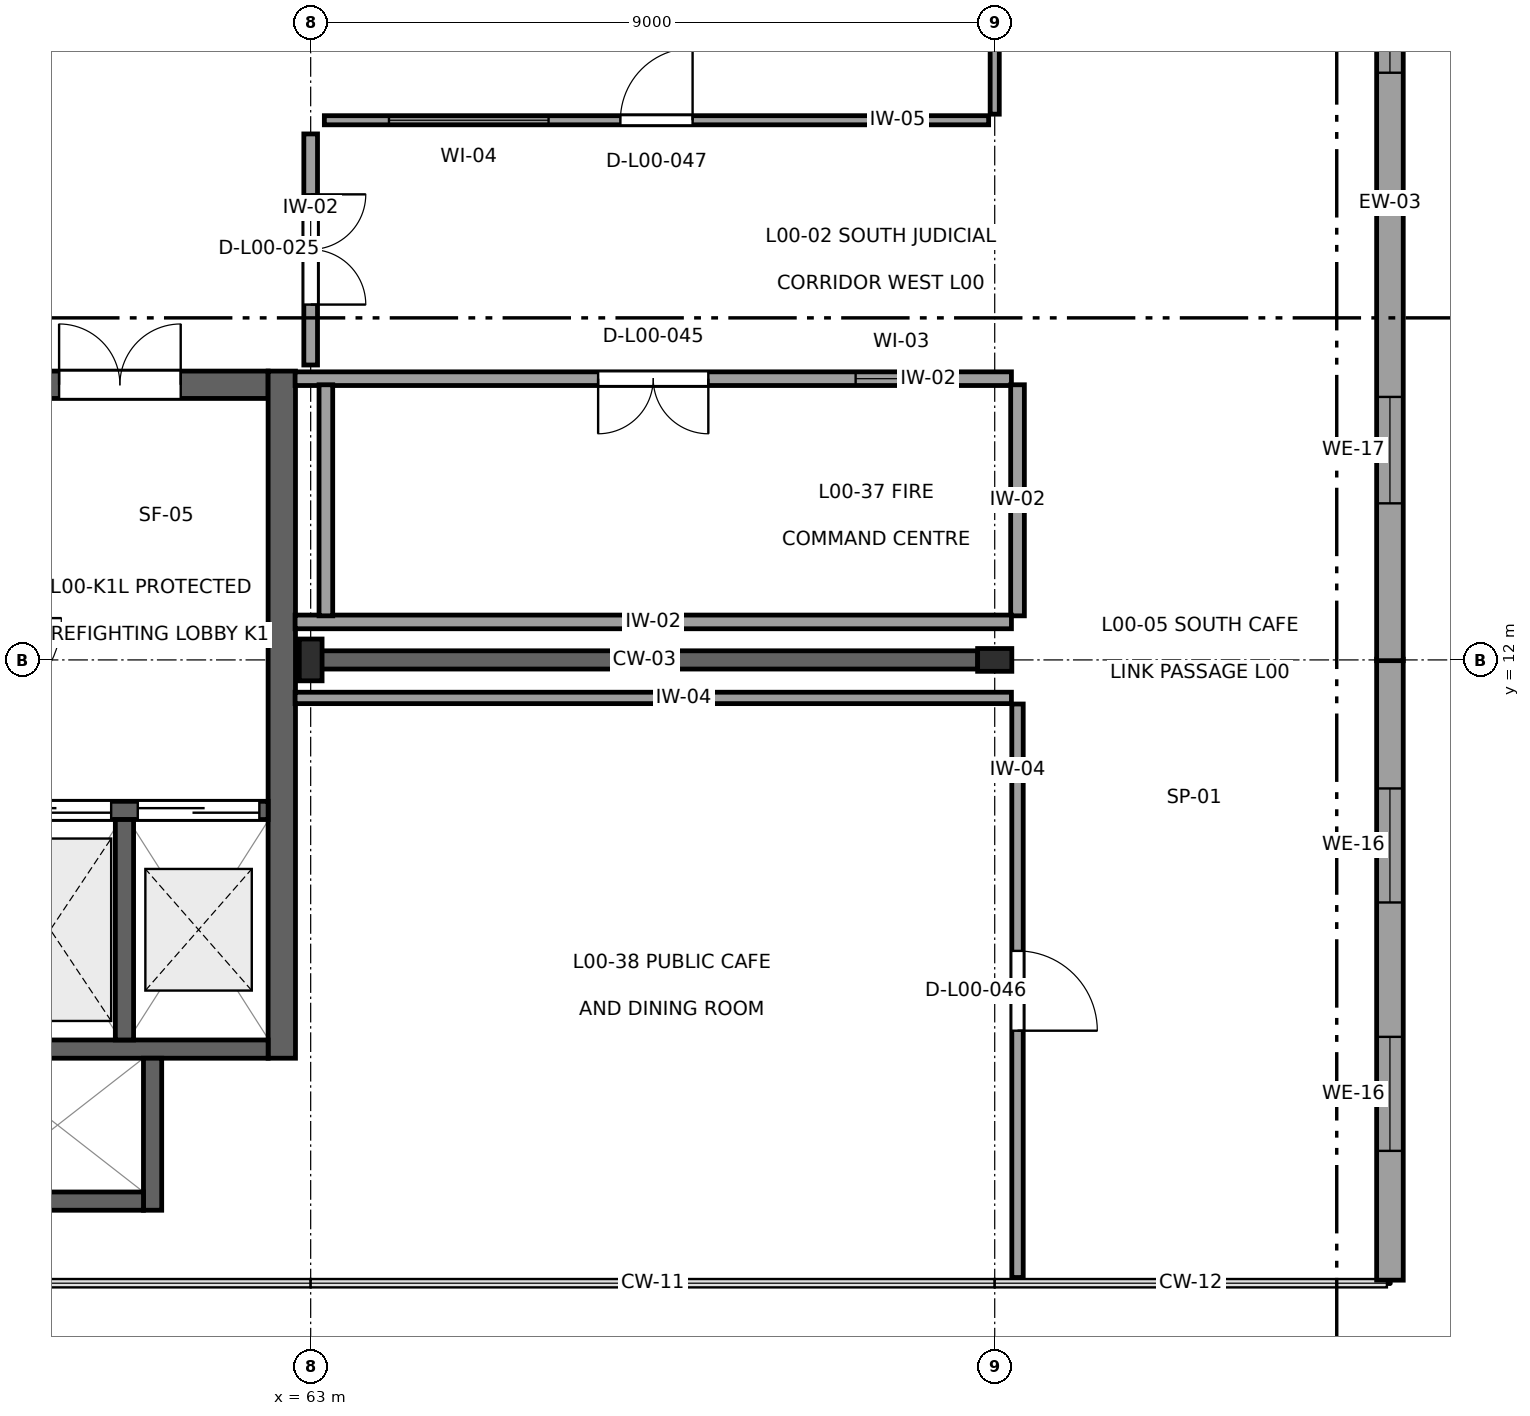
"""IFC4 building model, lengths in metres.
Left out: names, types, materials, properties, quantities, classifications, styles, units other than length and angle.
Written with IfcOpenShell. Run it as: python <this file> out.ifc"""

import sys

from ifc_helpers import new_model, si_unit, direction, frame, frame_2d, origin, origin_2d, place, context, subcontext, project, spatial, rectangle, i_section, extrude, element, fill, save


model = new_model("IFC4")
c1 = context("Model", 3, precision=1e-05, world=origin(), true_north=direction((0.0, 1.0)))
c2 = subcontext(c1, "Body", "Model", "MODEL_VIEW")
j1 = project(units=[si_unit("LENGTHUNIT", "METRE"), si_unit("PLANEANGLEUNIT", "RADIAN")], contexts=[c1])
p1 = place(None, origin())
s1 = spatial("IfcSite", under=j1, at=p1, CompositionType="ELEMENT")
p2 = place(p1, origin())
s2 = spatial("IfcBuilding", under=s1, at=p2, CompositionType="ELEMENT")
p3 = place(p2, origin())
s3 = spatial("IfcBuildingStorey", under=s2, at=p3, CompositionType="ELEMENT", Elevation=0.0)
p4 = place(p3, frame((63.0, 12.0, 0.0), z_axis=(0.0, 0.0, 1.0), x_axis=(1.0, 0.0, 0.0)))
e1 = element("IfcColumn", 1, at=p4, inside=s3, PredefinedType="COLUMN", context=c2, shape_type="SweptSolid", body=[
    extrude(i_section(OverallWidth=0.3, OverallDepth=0.55, WebThickness=0.015, FlangeThickness=0.029, at=origin_2d()), origin(), (0.0, 0.0, 1.0), 5.4),
])
p5 = place(p3, frame((72.0, 12.0, 0.0), z_axis=(0.0, 0.0, 1.0), x_axis=(0.0, 1.0, 0.0)))
e2 = element("IfcColumn", 2, at=p5, inside=s3, PredefinedType="COLUMN", context=c2, shape_type="SweptSolid", body=[
    extrude(i_section(OverallWidth=0.3, OverallDepth=0.45, WebThickness=0.014, FlangeThickness=0.026, at=origin_2d()), origin(), (0.0, 0.0, 1.0), 5.4),
])
p6 = place(p3, frame((77.2, 3.84, 0.0), z_axis=(0.0, 0.0, 1.0), x_axis=(0.0, 1.0, 0.0)))
e3 = element("IfcWall", 3, at=p6, inside=s3, PredefinedType="SOLIDWALL", context=c2, shape_type="SweptSolid", body=[
    extrude(rectangle(XDim=8.17, YDim=0.35, at=frame_2d((4.085, 0.0))), origin(), (0.0, 0.0, 1.0), 5.08),
])
p7 = place(p6, frame((1.701, 0.0, 0.85)))
e4 = element("IfcOpeningElement", 4, at=p7, cuts=e3, PredefinedType="OPENING", context=c2, shape_type="SweptSolid", body=[
    extrude(rectangle(XDim=1.5, YDim=1.5, at=frame_2d((0.75, 0.75))), frame((0.0, 0.19, 0.0), z_axis=(0.0, -1.0, 0.0), x_axis=(1.0, 0.0, 0.0)), (0.0, 0.0, 1.0), 0.38),
])
p8 = place(p6, frame((4.969, 0.0, 0.85)))
e5 = element("IfcOpeningElement", 5, at=p8, cuts=e3, PredefinedType="OPENING", context=c2, shape_type="SweptSolid", body=[
    extrude(rectangle(XDim=1.5, YDim=1.5, at=frame_2d((0.75, 0.75))), frame((0.0, 0.19, 0.0), z_axis=(0.0, -1.0, 0.0), x_axis=(1.0, 0.0, 0.0)), (0.0, 0.0, 1.0), 0.38),
])
p9 = place(p3, frame((77.2, 11.99, 0.0), z_axis=(0.0, 0.0, 1.0), x_axis=(0.0, 1.0, 0.0)))
e6 = element("IfcWall", 6, at=p9, inside=s3, PredefinedType="SOLIDWALL", context=c2, shape_type="SweptSolid", body=[
    extrude(rectangle(XDim=12.05, YDim=0.35, at=frame_2d((6.025, 0.0))), origin(), (0.0, 0.0, 1.0), 5.08),
])
p10 = place(p9, frame((2.07, 0.0, 0.85)))
e7 = element("IfcOpeningElement", 7, at=p10, cuts=e6, PredefinedType="OPENING", context=c2, shape_type="SweptSolid", body=[
    extrude(rectangle(XDim=1.4, YDim=1.4, at=frame_2d((0.7, 0.7))), frame((0.0, 0.19, 0.0), z_axis=(0.0, -1.0, 0.0), x_axis=(1.0, 0.0, 0.0)), (0.0, 0.0, 1.0), 0.38),
])
p11 = place(p9, frame((7.735, 0.0, 0.85)))
e8 = element("IfcOpeningElement", 8, at=p11, cuts=e6, PredefinedType="OPENING", context=c2, shape_type="SweptSolid", body=[
    extrude(rectangle(XDim=1.4, YDim=1.4, at=frame_2d((0.7, 0.7))), frame((0.0, 0.19, 0.0), z_axis=(0.0, -1.0, 0.0), x_axis=(1.0, 0.0, 0.0)), (0.0, 0.0, 1.0), 0.38),
])
p12 = place(p3, frame((58.54, 15.62, 0.0), z_axis=(0.0, 0.0, 1.0), x_axis=(1.0, 0.0, 0.0)))
e9 = element("IfcWall", 9, at=p12, inside=s3, PredefinedType="SHEAR", context=c2, shape_type="SweptSolid", body=[
    extrude(rectangle(XDim=3.9, YDim=0.36, at=frame_2d((1.95, 0.0))), origin(), (0.0, 0.0, 1.0), 5.06),
])
p13 = place(p12, frame((1.15, 0.0, 0.0)))
e10 = element("IfcOpeningElement", 10, at=p13, cuts=e9, PredefinedType="OPENING", context=c2, shape_type="SweptSolid", body=[
    extrude(rectangle(XDim=1.6, YDim=2.25, at=frame_2d((0.8, 1.125))), frame((0.0, 0.195, 0.0), z_axis=(0.0, -1.0, 0.0), x_axis=(1.0, 0.0, 0.0)), (0.0, 0.0, 1.0), 0.39),
])
p14 = place(p3, frame((62.62, 6.76, 0.0), z_axis=(0.0, 0.0, 1.0), x_axis=(0.0, 1.0, 0.0)))
e11 = element("IfcWall", 11, at=p14, inside=s3, PredefinedType="SHEAR", context=c2, shape_type="SweptSolid", body=[
    extrude(rectangle(XDim=9.04, YDim=0.36, at=frame_2d((4.52, 0.0))), origin(), (0.0, 0.0, 1.0), 5.06),
])
p15 = place(p3, frame((58.54, 10.02, 0.0), z_axis=(0.0, 0.0, 1.0), x_axis=(1.0, 0.0, 0.0)))
e12 = element("IfcWall", 12, at=p15, inside=s3, PredefinedType="SHEAR", context=c2, shape_type="SweptSolid", body=[
    extrude(rectangle(XDim=3.9, YDim=0.24, at=frame_2d((1.95, 0.0))), origin(), (0.0, 0.0, 1.0), 5.21),
])
p16 = place(p15, frame((0.235, 0.0, 0.0)))
e13 = element("IfcOpeningElement", 13, at=p16, cuts=e12, PredefinedType="OPENING", context=c2, shape_type="SweptSolid", body=[
    extrude(rectangle(XDim=1.6, YDim=2.3, at=frame_2d((0.8, 1.15))), frame((0.0, 0.135, 0.0), z_axis=(0.0, -1.0, 0.0), x_axis=(1.0, 0.0, 0.0)), (0.0, 0.0, 1.0), 0.27),
])
p17 = place(p15, frame((2.185, 0.0, 0.0)))
e14 = element("IfcOpeningElement", 14, at=p17, cuts=e12, PredefinedType="OPENING", context=c2, shape_type="SweptSolid", body=[
    extrude(rectangle(XDim=1.6, YDim=2.3, at=frame_2d((0.8, 1.15))), frame((0.0, 0.135, 0.0), z_axis=(0.0, -1.0, 0.0), x_axis=(1.0, 0.0, 0.0)), (0.0, 0.0, 1.0), 0.27),
])
p18 = place(p3, frame((58.54, 6.88, 0.0), z_axis=(0.0, 0.0, 1.0), x_axis=(1.0, 0.0, 0.0)))
e15 = element("IfcWall", 15, at=p18, inside=s3, PredefinedType="SHEAR", context=c2, shape_type="SweptSolid", body=[
    extrude(rectangle(XDim=3.9, YDim=0.24, at=frame_2d((1.95, 0.0))), origin(), (0.0, 0.0, 1.0), 5.21),
])
p19 = place(p3, frame((60.55, 7.0, 0.0), z_axis=(0.0, 0.0, 1.0), x_axis=(0.0, 1.0, 0.0)))
e16 = element("IfcWall", 16, at=p19, inside=s3, PredefinedType="SHEAR", context=c2, shape_type="SweptSolid", body=[
    extrude(rectangle(XDim=2.9, YDim=0.24, at=frame_2d((1.45, 0.0))), origin(), (0.0, 0.0, 1.0), 5.21),
])
p20 = place(p3, frame((60.92, 4.76, 0.0), z_axis=(0.0, 0.0, 1.0), x_axis=(0.0, 1.0, 0.0)))
e17 = element("IfcWall", 17, at=p20, inside=s3, PredefinedType="SHEAR", context=c2, shape_type="SweptSolid", body=[
    extrude(rectangle(XDim=2.0, YDim=0.24, at=frame_2d((1.0, 0.0))), origin(), (0.0, 0.0, 1.0), 5.21),
])
p21 = place(p3, frame((58.54, 4.88, 0.0), z_axis=(0.0, 0.0, 1.0), x_axis=(1.0, 0.0, 0.0)))
e18 = element("IfcWall", 18, at=p21, inside=s3, PredefinedType="SHEAR", context=c2, shape_type="SweptSolid", body=[
    extrude(rectangle(XDim=2.26, YDim=0.24, at=frame_2d((1.13, 0.0))), origin(), (0.0, 0.0, 1.0), 5.21),
])
p22 = place(p3, frame((63.008, 12.0, 0.0), z_axis=(0.0, 0.0, 1.0), x_axis=(1.0, 0.0, 0.0)))
e19 = element("IfcWall", 19, at=p22, inside=s3, PredefinedType="SHEAR", context=c2, shape_type="SweptSolid", body=[
    extrude(rectangle(XDim=8.769, YDim=0.24, at=frame_2d((4.385, 0.0))), origin(), (0.0, 0.0, 1.0), 4.535),
])
p23 = place(p3, frame((63.0, 18.92, 0.0), z_axis=(0.0, 0.0, 1.0), x_axis=(0.0, -1.0, 0.0)))
e20 = element("IfcWall", 20, at=p23, inside=s3, PredefinedType="PARTITIONING", context=c2, shape_type="SweptSolid", body=[
    extrude(rectangle(XDim=3.04, YDim=0.18, at=frame_2d((1.52, 0.0))), origin(), (0.0, 0.0, 1.0), 4.635),
])
p24 = place(p23, frame((0.795, 0.0, 0.0)))
e21 = element("IfcOpeningElement", 21, at=p24, cuts=e20, PredefinedType="OPENING", context=c2, shape_type="SweptSolid", body=[
    extrude(rectangle(XDim=1.45, YDim=2.2, at=frame_2d((0.725, 1.1))), frame((0.0, 0.105, 0.0), z_axis=(0.0, -1.0, 0.0), x_axis=(1.0, 0.0, 0.0)), (0.0, 0.0, 1.0), 0.21),
])
p25 = place(p3, frame((62.795, 15.7, 0.0), z_axis=(0.0, 0.0, 1.0), x_axis=(1.0, 0.0, 0.0)))
e22 = element("IfcWall", 22, at=p25, inside=s3, PredefinedType="PARTITIONING", context=c2, shape_type="SweptSolid", body=[
    extrude(rectangle(XDim=9.425, YDim=0.18, at=frame_2d((4.712, 0.0))), origin(), (0.0, 0.0, 1.0), 5.04),
])
p26 = place(p25, frame((3.987, 0.0, 0.0)))
e23 = element("IfcOpeningElement", 23, at=p26, cuts=e22, PredefinedType="OPENING", context=c2, shape_type="SweptSolid", body=[
    extrude(rectangle(XDim=1.45, YDim=2.3, at=frame_2d((0.725, 1.15))), frame((0.0, 0.105, 0.0), z_axis=(0.0, -1.0, 0.0), x_axis=(1.0, 0.0, 0.0)), (0.0, 0.0, 1.0), 0.21),
])
p27 = place(p25, frame((7.375, 0.0, 1.05)))
e24 = element("IfcOpeningElement", 24, at=p27, cuts=e22, PredefinedType="OPENING", context=c2, shape_type="SweptSolid", body=[
    extrude(rectangle(XDim=1.2, YDim=1.0, at=frame_2d((0.6, 0.5))), frame((0.0, 0.105, 0.0), z_axis=(0.0, -1.0, 0.0), x_axis=(1.0, 0.0, 0.0)), (0.0, 0.0, 1.0), 0.21),
])
p28 = place(p3, frame((72.3, 15.62, 0.0), z_axis=(0.0, 0.0, 1.0), x_axis=(0.0, -1.0, 0.0)))
e25 = element("IfcWall", 25, at=p28, inside=s3, PredefinedType="PARTITIONING", context=c2, shape_type="SweptSolid", body=[
    extrude(rectangle(XDim=3.04, YDim=0.18, at=frame_2d((1.52, 0.0))), origin(), (0.0, 0.0, 1.0), 5.04),
])
p29 = place(p3, frame((72.22, 12.5, 0.0), z_axis=(0.0, 0.0, 1.0), x_axis=(-1.0, 0.0, 0.0)))
e26 = element("IfcWall", 26, at=p29, inside=s3, PredefinedType="PARTITIONING", context=c2, shape_type="SweptSolid", body=[
    extrude(rectangle(XDim=9.425, YDim=0.18, at=frame_2d((4.712, 0.0))), origin(), (0.0, 0.0, 1.0), 5.04),
])
p30 = place(p3, frame((63.2, 12.58, 0.0), z_axis=(0.0, 0.0, 1.0), x_axis=(0.0, 1.0, 0.0)))
e27 = element("IfcWall", 27, at=p30, inside=s3, PredefinedType="PARTITIONING", context=c2, shape_type="SweptSolid", body=[
    extrude(rectangle(XDim=3.04, YDim=0.18, at=frame_2d((1.52, 0.0))), origin(), (0.0, 0.0, 1.0), 4.635),
])
p31 = place(p3, frame((72.3, 11.42, 0.0), z_axis=(0.0, 0.0, 1.0), x_axis=(0.0, -1.0, 0.0)))
e28 = element("IfcWall", 28, at=p31, inside=s3, PredefinedType="PARTITIONING", context=c2, shape_type="SweptSolid", body=[
    extrude(rectangle(XDim=7.545, YDim=0.15, at=frame_2d((3.772, 0.0))), origin(), (0.0, 0.0, 1.0), 5.04),
])
p32 = place(p31, frame((3.248, 0.0, 0.0)))
e29 = element("IfcOpeningElement", 29, at=p32, cuts=e28, PredefinedType="OPENING", context=c2, shape_type="SweptSolid", body=[
    extrude(rectangle(XDim=1.05, YDim=2.25, at=frame_2d((0.525, 1.125))), frame((0.0, 0.09, 0.0), z_axis=(0.0, -1.0, 0.0), x_axis=(1.0, 0.0, 0.0)), (0.0, 0.0, 1.0), 0.18),
])
p33 = place(p3, frame((62.795, 11.5, 0.0), z_axis=(0.0, 0.0, 1.0), x_axis=(1.0, 0.0, 0.0)))
e30 = element("IfcWall", 30, at=p33, inside=s3, PredefinedType="PARTITIONING", context=c2, shape_type="SweptSolid", body=[
    extrude(rectangle(XDim=9.425, YDim=0.15, at=frame_2d((4.712, 0.0))), origin(), (0.0, 0.0, 1.0), 5.04),
])
p34 = place(p3, frame((72.0, 23.52, 0.0), z_axis=(0.0, 0.0, 1.0), x_axis=(0.0, -1.0, 0.0)))
e31 = element("IfcWall", 31, at=p34, inside=s3, PredefinedType="PARTITIONING", context=c2, shape_type="SweptSolid", body=[
    extrude(rectangle(XDim=4.34, YDim=0.12, at=frame_2d((2.17, 0.0))), origin(), (0.0, 0.0, 1.0), 4.585),
])
p35 = place(p3, frame((71.92, 19.1, 0.0), z_axis=(0.0, 0.0, 1.0), x_axis=(-1.0, 0.0, 0.0)))
e32 = element("IfcWall", 32, at=p35, inside=s3, PredefinedType="PARTITIONING", context=c2, shape_type="SweptSolid", body=[
    extrude(rectangle(XDim=8.74, YDim=0.12, at=frame_2d((4.37, 0.0))), origin(), (0.0, 0.0, 1.0), 5.04),
])
p36 = place(p35, frame((3.895, 0.0, 0.0)))
e33 = element("IfcOpeningElement", 33, at=p36, cuts=e32, PredefinedType="OPENING", context=c2, shape_type="SweptSolid", body=[
    extrude(rectangle(XDim=0.95, YDim=2.15, at=frame_2d((0.475, 1.075))), frame((0.0, 0.075, 0.0), z_axis=(0.0, -1.0, 0.0), x_axis=(1.0, 0.0, 0.0)), (0.0, 0.0, 1.0), 0.15),
])
p37 = place(p35, frame((5.79, 0.0, 1.05)))
e34 = element("IfcOpeningElement", 34, at=p37, cuts=e32, PredefinedType="OPENING", context=c2, shape_type="SweptSolid", body=[
    extrude(rectangle(XDim=2.1, YDim=1.2, at=frame_2d((1.05, 0.6))), frame((0.0, 0.075, 0.0), z_axis=(0.0, -1.0, 0.0), x_axis=(1.0, 0.0, 0.0)), (0.0, 0.0, 1.0), 0.15),
])
p38 = place(p7, origin())
e35 = element("IfcWindow", 35, at=p38, inside=s3, PartitioningType="SINGLE_PANEL", PredefinedType="WINDOW", context=c2, shape_type="SweptSolid", body=[
    extrude(rectangle(XDim=1.5, YDim=1.5, at=frame_2d((0.75, 0.75))), frame((0.0, 0.03, 0.0), z_axis=(0.0, -1.0, 0.0), x_axis=(1.0, 0.0, 0.0)), (0.0, 0.0, 1.0), 0.06),
])
fill(e4, e35)
p39 = place(p8, origin())
e36 = element("IfcWindow", 36, at=p39, inside=s3, PartitioningType="SINGLE_PANEL", PredefinedType="WINDOW", context=c2, shape_type="SweptSolid", body=[
    extrude(rectangle(XDim=1.5, YDim=1.5, at=frame_2d((0.75, 0.75))), frame((0.0, 0.03, 0.0), z_axis=(0.0, -1.0, 0.0), x_axis=(1.0, 0.0, 0.0)), (0.0, 0.0, 1.0), 0.06),
])
fill(e5, e36)
p40 = place(p10, origin())
e37 = element("IfcWindow", 37, at=p40, inside=s3, PartitioningType="SINGLE_PANEL", PredefinedType="WINDOW", context=c2, shape_type="SweptSolid", body=[
    extrude(rectangle(XDim=1.4, YDim=1.4, at=frame_2d((0.7, 0.7))), frame((0.0, 0.03, 0.0), z_axis=(0.0, -1.0, 0.0), x_axis=(1.0, 0.0, 0.0)), (0.0, 0.0, 1.0), 0.06),
])
fill(e7, e37)
p41 = place(p11, origin())
e38 = element("IfcWindow", 38, at=p41, inside=s3, PartitioningType="SINGLE_PANEL", PredefinedType="WINDOW", context=c2, shape_type="SweptSolid", body=[
    extrude(rectangle(XDim=1.4, YDim=1.4, at=frame_2d((0.7, 0.7))), frame((0.0, 0.03, 0.0), z_axis=(0.0, -1.0, 0.0), x_axis=(1.0, 0.0, 0.0)), (0.0, 0.0, 1.0), 0.06),
])
fill(e8, e38)
p42 = place(p13, origin())
e39 = element("IfcDoor", 39, at=p42, inside=s3, OperationType="DOUBLE_DOOR_SINGLE_SWING", PredefinedType="DOOR", context=c2, shape_type="SweptSolid", body=[
    extrude(rectangle(XDim=1.6, YDim=2.25, at=frame_2d((0.8, 1.125))), frame((0.0, 0.025, 0.0), z_axis=(0.0, -1.0, 0.0), x_axis=(1.0, 0.0, 0.0)), (0.0, 0.0, 1.0), 0.05),
])
fill(e10, e39)
p43 = place(p16, origin())
e40 = element("IfcDoor", 40, at=p43, inside=s3, OperationType="DOUBLE_DOOR_SLIDING", PredefinedType="DOOR", context=c2, shape_type="SweptSolid", body=[
    extrude(rectangle(XDim=1.6, YDim=2.3, at=frame_2d((0.8, 1.15))), frame((0.0, 0.025, 0.0), z_axis=(0.0, -1.0, 0.0), x_axis=(1.0, 0.0, 0.0)), (0.0, 0.0, 1.0), 0.05),
])
fill(e13, e40)
p44 = place(p17, origin())
e41 = element("IfcDoor", 41, at=p44, inside=s3, OperationType="DOUBLE_DOOR_SLIDING", PredefinedType="DOOR", context=c2, shape_type="SweptSolid", body=[
    extrude(rectangle(XDim=1.6, YDim=2.3, at=frame_2d((0.8, 1.15))), frame((0.0, 0.025, 0.0), z_axis=(0.0, -1.0, 0.0), x_axis=(1.0, 0.0, 0.0)), (0.0, 0.0, 1.0), 0.05),
])
fill(e14, e41)
p45 = place(p24, origin())
e42 = element("IfcDoor", 42, at=p45, inside=s3, OperationType="DOUBLE_DOOR_SINGLE_SWING", PredefinedType="DOOR", context=c2, shape_type="SweptSolid", body=[
    extrude(rectangle(XDim=1.45, YDim=2.2, at=frame_2d((0.725, 1.1))), frame((0.0, 0.025, 0.0), z_axis=(0.0, -1.0, 0.0), x_axis=(1.0, 0.0, 0.0)), (0.0, 0.0, 1.0), 0.05),
])
fill(e21, e42)
p46 = place(p26, frame((1.45, 0.0, 0.0), z_axis=(0.0, 0.0, 1.0), x_axis=(-1.0, 0.0, 0.0)))
e43 = element("IfcDoor", 43, at=p46, inside=s3, OperationType="DOUBLE_DOOR_SINGLE_SWING", PredefinedType="DOOR", context=c2, shape_type="SweptSolid", body=[
    extrude(rectangle(XDim=1.45, YDim=2.3, at=frame_2d((0.725, 1.15))), frame((0.0, 0.025, 0.0), z_axis=(0.0, -1.0, 0.0), x_axis=(1.0, 0.0, 0.0)), (0.0, 0.0, 1.0), 0.05),
])
fill(e23, e43)
p47 = place(p27, origin())
e44 = element("IfcWindow", 44, at=p47, inside=s3, PartitioningType="SINGLE_PANEL", PredefinedType="WINDOW", context=c2, shape_type="SweptSolid", body=[
    extrude(rectangle(XDim=1.2, YDim=1.0, at=frame_2d((0.6, 0.5))), frame((0.0, 0.03, 0.0), z_axis=(0.0, -1.0, 0.0), x_axis=(1.0, 0.0, 0.0)), (0.0, 0.0, 1.0), 0.06),
])
fill(e24, e44)
p48 = place(p32, origin())
e45 = element("IfcDoor", 45, at=p48, inside=s3, OperationType="SINGLE_SWING_RIGHT", PredefinedType="DOOR", context=c2, shape_type="SweptSolid", body=[
    extrude(rectangle(XDim=1.05, YDim=2.25, at=frame_2d((0.525, 1.125))), frame((0.0, 0.025, 0.0), z_axis=(0.0, -1.0, 0.0), x_axis=(1.0, 0.0, 0.0)), (0.0, 0.0, 1.0), 0.05),
])
fill(e29, e45)
p49 = place(p36, frame((0.95, 0.0, 0.0), z_axis=(0.0, 0.0, 1.0), x_axis=(-1.0, 0.0, 0.0)))
e46 = element("IfcDoor", 46, at=p49, inside=s3, OperationType="SINGLE_SWING_LEFT", PredefinedType="DOOR", context=c2, shape_type="SweptSolid", body=[
    extrude(rectangle(XDim=0.95, YDim=2.15, at=frame_2d((0.475, 1.075))), frame((0.0, 0.025, 0.0), z_axis=(0.0, -1.0, 0.0), x_axis=(1.0, 0.0, 0.0)), (0.0, 0.0, 1.0), 0.05),
])
fill(e33, e46)
p50 = place(p37, origin())
e47 = element("IfcWindow", 47, at=p50, inside=s3, PartitioningType="SINGLE_PANEL", PredefinedType="WINDOW", context=c2, shape_type="SweptSolid", body=[
    extrude(rectangle(XDim=2.1, YDim=1.2, at=frame_2d((1.05, 0.6))), frame((0.0, 0.03, 0.0), z_axis=(0.0, -1.0, 0.0), x_axis=(1.0, 0.0, 0.0)), (0.0, 0.0, 1.0), 0.06),
])
fill(e34, e47)
save(model, sys.argv[1])
